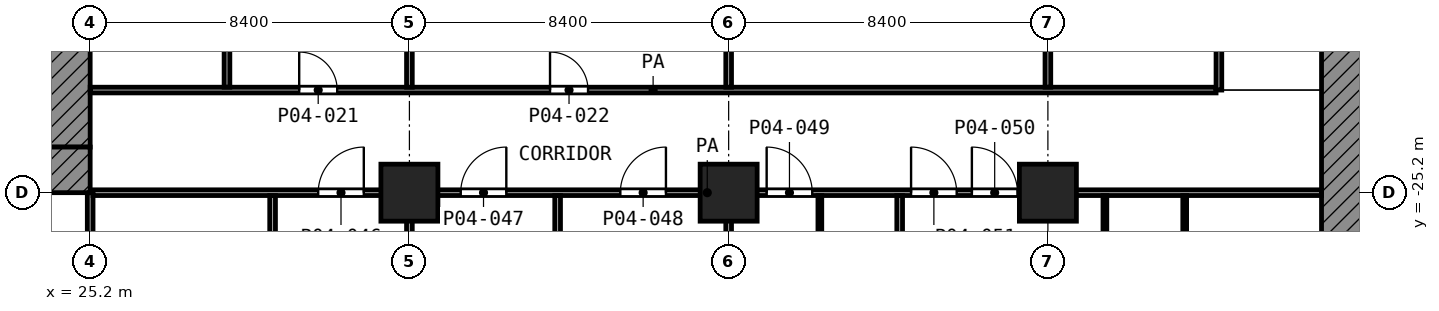
"""IFC4 building model, lengths in metres.
Left out: names, types, materials, properties, quantities, classifications, styles, units other than length and angle.
Written with IfcOpenShell. Run it as: python <this file> out.ifc"""

import sys

from ifc_helpers import new_model, si_unit, direction, frame, frame_2d, origin, origin_2d, place, context, subcontext, project, spatial, polyline, rectangle, outline, extrude, element, fill, save


model = new_model("IFC4")
c1 = context("Model", 3, precision=1e-05, world=origin(), true_north=direction((0.0, 1.0)))
c2 = subcontext(c1, "Body", "Model", "MODEL_VIEW")
j1 = project(units=[si_unit("LENGTHUNIT", "METRE"), si_unit("PLANEANGLEUNIT", "RADIAN")], contexts=[c1])
p1 = place(None, origin())
s1 = spatial("IfcSite", under=j1, at=p1, CompositionType="ELEMENT")
p2 = place(p1, origin())
s2 = spatial("IfcBuilding", under=s1, at=p2, CompositionType="ELEMENT")
p3 = place(p2, frame((0.0, 0.0, 18.2)))
s3 = spatial("IfcBuildingStorey", under=s2, at=p3, CompositionType="ELEMENT", Elevation=18.2)
for number, where, z_axis, x_axis in (
    (1, (33.6, -25.2, 0.0), (0.0, 0.0, 1.0), (1.0, 0.0, 0.0)),
    (2, (42.0, -25.2, 0.0), (0.0, 0.0, 1.0), (1.0, 0.0, 0.0)),
    (3, (50.4, -25.2, 0.0), (0.0, 0.0, 1.0), (1.0, 0.0, 0.0)),
):
    element("IfcColumn", number, at=place(p3, frame(where, z_axis=z_axis, x_axis=x_axis)), inside=s3, PredefinedType="COLUMN", context=c2, shape_type="SweptSolid", body=[
        extrude(rectangle(XDim=1.5, YDim=1.5, at=origin_2d()), origin(), (0.0, 0.0, 1.0), 5.6),
    ])
p4 = place(p3, frame((0.0, 0.0, -18.2), z_axis=(0.0, -1.0, 0.0), x_axis=(1.0, 0.0, 0.0)))
e4 = element("IfcWall", 4, at=p4, inside=s3, PredefinedType="SHEAR", context=c2, shape_type="SweptSolid", body=[
    extrude(outline(polyline([(67.2, 23.25), (67.2, 22.4), (65.406, 21.022), (63.824, 19.406), (62.938, 18.2), (57.6, 18.2), (57.6, 23.25), (67.2, 23.25)])), origin(), (0.0, 0.0, 1.0), 33.6),
])
p5 = place(p3, frame((24.6, -24.0, 0.0), z_axis=(0.0, 0.0, 1.0), x_axis=(0.0, 1.0, 0.0)))
e5 = element("IfcWall", 5, at=p5, inside=s3, PredefinedType="SHEAR", context=c2, shape_type="SweptSolid", body=[
    extrude(rectangle(XDim=18.6, YDim=1.2, at=frame_2d((9.3, 0.0))), origin(), (0.0, 0.0, 1.0), 5.05),
])
p6 = place(p5, frame((10.5, 0.0, 0.0)))
e6 = element("IfcOpeningElement", 6, at=p6, cuts=e5, PredefinedType="OPENING", context=c2, shape_type="SweptSolid", body=[
    extrude(rectangle(XDim=1.8, YDim=2.1, at=frame_2d((0.9, 1.05))), frame((0.0, 0.61, 0.0), z_axis=(0.0, -1.0, 0.0), x_axis=(1.0, 0.0, 0.0)), (0.0, 0.0, 1.0), 1.22),
])
p7 = place(p3, frame((24.6, -25.2, 0.0), z_axis=(0.0, 0.0, 1.0), x_axis=(0.0, 1.0, 0.0)))
e7 = element("IfcWall", 7, at=p7, inside=s3, PredefinedType="SHEAR", context=c2, shape_type="SweptSolid", body=[
    extrude(rectangle(XDim=1.2, YDim=1.2, at=frame_2d((0.6, 0.0))), origin(), (0.0, 0.0, 1.0), 5.05),
])
p8 = place(p3, frame((44.4, -27.9, 0.0), z_axis=(0.0, 0.0, 1.0), x_axis=(0.0, 1.0, 0.0)))
e8 = element("IfcWall", 8, at=p8, inside=s3, PredefinedType="PARTITIONING", context=c2, shape_type="SweptSolid", body=[
    extrude(rectangle(XDim=2.625, YDim=0.1, at=frame_2d((1.312, 0.0))), origin(), (0.0, 0.0, 1.0), 5.05),
])
for number, where, z_axis, x_axis in (
    (9, (51.9, -27.898, 0.0), (0.0, 0.0, 1.0), (0.0, 1.0, 0.0)),
    (10, (54.0, -27.898, 0.0), (0.0, 0.0, 1.0), (0.0, 1.0, 0.0)),
):
    element("IfcWall", number, at=place(p3, frame(where, z_axis=z_axis, x_axis=x_axis)), inside=s3, PredefinedType="PARTITIONING", context=c2, shape_type="SweptSolid", body=[
        extrude(rectangle(XDim=2.623, YDim=0.1, at=frame_2d((1.312, 0.0))), origin(), (0.0, 0.0, 1.0), 5.05),
    ])
p9 = place(p3, frame((25.275, -25.2, 0.0), z_axis=(0.0, 0.0, 1.0), x_axis=(1.0, 0.0, 0.0)))
e11 = element("IfcWall", 11, at=p9, inside=s3, PredefinedType="PARTITIONING", context=c2, shape_type="SweptSolid", body=[
    extrude(rectangle(XDim=32.325, YDim=0.15, at=frame_2d((16.163, 0.0))), origin(), (0.0, 0.0, 1.0), 5.05),
])
p10 = place(p9, frame((5.925, 0.0, 0.0)))
e12 = element("IfcOpeningElement", 12, at=p10, cuts=e11, PredefinedType="OPENING", context=c2, shape_type="SweptSolid", body=[
    extrude(rectangle(XDim=1.2, YDim=2.1, at=frame_2d((0.6, 1.05))), frame((0.0, 0.085, 0.0), z_axis=(0.0, -1.0, 0.0), x_axis=(1.0, 0.0, 0.0)), (0.0, 0.0, 1.0), 0.17),
])
p11 = place(p9, frame((9.675, 0.0, 0.0)))
e13 = element("IfcOpeningElement", 13, at=p11, cuts=e11, PredefinedType="OPENING", context=c2, shape_type="SweptSolid", body=[
    extrude(rectangle(XDim=1.2, YDim=2.1, at=frame_2d((0.6, 1.05))), frame((0.0, 0.085, 0.0), z_axis=(0.0, -1.0, 0.0), x_axis=(1.0, 0.0, 0.0)), (0.0, 0.0, 1.0), 0.17),
])
p12 = place(p9, frame((13.875, 0.0, 0.0)))
e14 = element("IfcOpeningElement", 14, at=p12, cuts=e11, PredefinedType="OPENING", context=c2, shape_type="SweptSolid", body=[
    extrude(rectangle(XDim=1.2, YDim=2.1, at=frame_2d((0.6, 1.05))), frame((0.0, 0.085, 0.0), z_axis=(0.0, -1.0, 0.0), x_axis=(1.0, 0.0, 0.0)), (0.0, 0.0, 1.0), 0.17),
])
p13 = place(p9, frame((17.725, 0.0, 0.0)))
e15 = element("IfcOpeningElement", 15, at=p13, cuts=e11, PredefinedType="OPENING", context=c2, shape_type="SweptSolid", body=[
    extrude(rectangle(XDim=1.2, YDim=2.1, at=frame_2d((0.6, 1.05))), frame((0.0, 0.085, 0.0), z_axis=(0.0, -1.0, 0.0), x_axis=(1.0, 0.0, 0.0)), (0.0, 0.0, 1.0), 0.17),
])
p14 = place(p9, frame((23.125, 0.0, 0.0)))
e16 = element("IfcOpeningElement", 16, at=p14, cuts=e11, PredefinedType="OPENING", context=c2, shape_type="SweptSolid", body=[
    extrude(rectangle(XDim=1.2, YDim=2.1, at=frame_2d((0.6, 1.05))), frame((0.0, 0.085, 0.0), z_axis=(0.0, -1.0, 0.0), x_axis=(1.0, 0.0, 0.0)), (0.0, 0.0, 1.0), 0.17),
])
p15 = place(p9, frame((21.525, 0.0, 0.0)))
e17 = element("IfcOpeningElement", 17, at=p15, cuts=e11, PredefinedType="OPENING", context=c2, shape_type="SweptSolid", body=[
    extrude(rectangle(XDim=1.2, YDim=2.1, at=frame_2d((0.6, 1.05))), frame((0.0, 0.085, 0.0), z_axis=(0.0, -1.0, 0.0), x_axis=(1.0, 0.0, 0.0)), (0.0, 0.0, 1.0), 0.17),
])
p16 = place(p3, frame((25.2, -22.5, 0.0), z_axis=(0.0, 0.0, 1.0), x_axis=(1.0, 0.0, 0.0)))
e18 = element("IfcWall", 18, at=p16, inside=s3, PredefinedType="PARTITIONING", context=c2, shape_type="SweptSolid", body=[
    extrude(rectangle(XDim=29.625, YDim=0.15, at=frame_2d((14.812, 0.0))), origin(), (0.0, 0.0, 1.0), 5.05),
])
p17 = place(p16, frame((5.5, 0.0, 0.0)))
e19 = element("IfcOpeningElement", 19, at=p17, cuts=e18, PredefinedType="OPENING", context=c2, shape_type="SweptSolid", body=[
    extrude(rectangle(XDim=1.0, YDim=2.1, at=frame_2d((0.5, 1.05))), frame((0.0, 0.085, 0.0), z_axis=(0.0, -1.0, 0.0), x_axis=(1.0, 0.0, 0.0)), (0.0, 0.0, 1.0), 0.17),
])
p18 = place(p16, frame((12.1, 0.0, 0.0)))
e20 = element("IfcOpeningElement", 20, at=p18, cuts=e18, PredefinedType="OPENING", context=c2, shape_type="SweptSolid", body=[
    extrude(rectangle(XDim=1.0, YDim=2.1, at=frame_2d((0.5, 1.05))), frame((0.0, 0.085, 0.0), z_axis=(0.0, -1.0, 0.0), x_axis=(1.0, 0.0, 0.0)), (0.0, 0.0, 1.0), 0.17),
])
p19 = place(p3, frame((25.2, -81.3, 0.0), z_axis=(0.0, 0.0, 1.0), x_axis=(0.0, 1.0, 0.0)))
e21 = element("IfcWall", 21, at=p19, inside=s3, PredefinedType="PARTITIONING", context=c2, shape_type="SweptSolid", body=[
    extrude(rectangle(XDim=56.1, YDim=0.15, at=frame_2d((28.05, 0.0))), origin(), (0.0, 0.0, 1.0), 5.05),
])
p20 = place(p19, frame((48.5, 0.0, 0.0)))
e22 = element("IfcOpeningElement", 22, at=p20, cuts=e21, PredefinedType="OPENING", context=c2, shape_type="SweptSolid", body=[
    extrude(rectangle(XDim=1.2, YDim=2.1, at=frame_2d((0.6, 1.05))), frame((0.0, 0.085, 0.0), z_axis=(0.0, -1.0, 0.0), x_axis=(1.0, 0.0, 0.0)), (0.0, 0.0, 1.0), 0.17),
])
p21 = place(p19, frame((40.1, 0.0, 0.0)))
e23 = element("IfcOpeningElement", 23, at=p21, cuts=e21, PredefinedType="OPENING", context=c2, shape_type="SweptSolid", body=[
    extrude(rectangle(XDim=1.2, YDim=2.1, at=frame_2d((0.6, 1.05))), frame((0.0, 0.085, 0.0), z_axis=(0.0, -1.0, 0.0), x_axis=(1.0, 0.0, 0.0)), (0.0, 0.0, 1.0), 0.17),
])
p22 = place(p19, frame((37.3, 0.0, 0.0)))
e24 = element("IfcOpeningElement", 24, at=p22, cuts=e21, PredefinedType="OPENING", context=c2, shape_type="SweptSolid", body=[
    extrude(rectangle(XDim=1.2, YDim=2.1, at=frame_2d((0.6, 1.05))), frame((0.0, 0.085, 0.0), z_axis=(0.0, -1.0, 0.0), x_axis=(1.0, 0.0, 0.0)), (0.0, 0.0, 1.0), 0.17),
])
p23 = place(p19, frame((28.9, 0.0, 0.0)))
e25 = element("IfcOpeningElement", 25, at=p23, cuts=e21, PredefinedType="OPENING", context=c2, shape_type="SweptSolid", body=[
    extrude(rectangle(XDim=1.2, YDim=2.1, at=frame_2d((0.6, 1.05))), frame((0.0, 0.085, 0.0), z_axis=(0.0, -1.0, 0.0), x_axis=(1.0, 0.0, 0.0)), (0.0, 0.0, 1.0), 0.17),
])
p24 = place(p19, frame((23.3, 0.0, 0.0)))
e26 = element("IfcOpeningElement", 26, at=p24, cuts=e21, PredefinedType="OPENING", context=c2, shape_type="SweptSolid", body=[
    extrude(rectangle(XDim=1.2, YDim=2.1, at=frame_2d((0.6, 1.05))), frame((0.0, 0.085, 0.0), z_axis=(0.0, -1.0, 0.0), x_axis=(1.0, 0.0, 0.0)), (0.0, 0.0, 1.0), 0.17),
])
p25 = place(p19, frame((20.6, 0.0, 0.0)))
e27 = element("IfcOpeningElement", 27, at=p25, cuts=e21, PredefinedType="OPENING", context=c2, shape_type="SweptSolid", body=[
    extrude(rectangle(XDim=1.1, YDim=2.1, at=frame_2d((0.55, 1.05))), frame((0.0, 0.085, 0.0), z_axis=(0.0, -1.0, 0.0), x_axis=(1.0, 0.0, 0.0)), (0.0, 0.0, 1.0), 0.17),
])
p26 = place(p19, frame((14.9, 0.0, 0.0)))
e28 = element("IfcOpeningElement", 28, at=p26, cuts=e21, PredefinedType="OPENING", context=c2, shape_type="SweptSolid", body=[
    extrude(rectangle(XDim=1.1, YDim=2.1, at=frame_2d((0.55, 1.05))), frame((0.0, 0.085, 0.0), z_axis=(0.0, -1.0, 0.0), x_axis=(1.0, 0.0, 0.0)), (0.0, 0.0, 1.0), 0.17),
])
p27 = place(p19, frame((7.5, 0.0, 0.0)))
e29 = element("IfcOpeningElement", 29, at=p27, cuts=e21, PredefinedType="OPENING", context=c2, shape_type="SweptSolid", body=[
    extrude(rectangle(XDim=1.2, YDim=2.1, at=frame_2d((0.6, 1.05))), frame((0.0, 0.085, 0.0), z_axis=(0.0, -1.0, 0.0), x_axis=(1.0, 0.0, 0.0)), (0.0, 0.0, 1.0), 0.17),
])
p28 = place(p19, frame((11.7, 0.0, 0.0)))
e30 = element("IfcOpeningElement", 30, at=p28, cuts=e21, PredefinedType="OPENING", context=c2, shape_type="SweptSolid", body=[
    extrude(rectangle(XDim=1.2, YDim=2.1, at=frame_2d((0.6, 1.05))), frame((0.0, 0.085, 0.0), z_axis=(0.0, -1.0, 0.0), x_axis=(1.0, 0.0, 0.0)), (0.0, 0.0, 1.0), 0.17),
])
p29 = place(p19, frame((3.15, 0.0, 0.0)))
e31 = element("IfcOpeningElement", 31, at=p29, cuts=e21, PredefinedType="OPENING", context=c2, shape_type="SweptSolid", body=[
    extrude(rectangle(XDim=1.2, YDim=2.1, at=frame_2d((0.6, 1.05))), frame((0.0, 0.085, 0.0), z_axis=(0.0, -1.0, 0.0), x_axis=(1.0, 0.0, 0.0)), (0.0, 0.0, 1.0), 0.17),
])
p30 = place(p3, frame((28.8, -22.425, 0.0), z_axis=(0.0, 0.0, 1.0), x_axis=(0.0, 1.0, 0.0)))
e32 = element("IfcWall", 32, at=p30, inside=s3, PredefinedType="PARTITIONING", context=c2, shape_type="SweptSolid", body=[
    extrude(rectangle(XDim=8.25, YDim=0.15, at=frame_2d((4.125, 0.0))), origin(), (0.0, 0.0, 1.0), 5.05),
])
for number, where, z_axis, x_axis in (
    (33, (30.0, -39.525, 0.0), (0.0, 0.0, 1.0), (0.0, 1.0, 0.0)),
    (34, (33.6, -39.525, 0.0), (0.0, 0.0, 1.0), (0.0, 1.0, 0.0)),
):
    element("IfcWall", number, at=place(p3, frame(where, z_axis=z_axis, x_axis=x_axis)), inside=s3, PredefinedType="PARTITIONING", context=c2, shape_type="SweptSolid", body=[
        extrude(rectangle(XDim=14.25, YDim=0.15, at=frame_2d((7.125, 0.0))), origin(), (0.0, 0.0, 1.0), 5.05),
    ])
p31 = place(p3, frame((33.6, -22.425, 0.0), z_axis=(0.0, 0.0, 1.0), x_axis=(0.0, 1.0, 0.0)))
e35 = element("IfcWall", 35, at=p31, inside=s3, PredefinedType="PARTITIONING", context=c2, shape_type="SweptSolid", body=[
    extrude(rectangle(XDim=11.25, YDim=0.15, at=frame_2d((5.625, 0.0))), origin(), (0.0, 0.0, 1.0), 5.05),
])
p32 = place(p3, frame((37.5, -39.525, 0.0), z_axis=(0.0, 0.0, 1.0), x_axis=(0.0, 1.0, 0.0)))
e36 = element("IfcWall", 36, at=p32, inside=s3, PredefinedType="PARTITIONING", context=c2, shape_type="SweptSolid", body=[
    extrude(rectangle(XDim=14.25, YDim=0.15, at=frame_2d((7.125, 0.0))), origin(), (0.0, 0.0, 1.0), 3.65),
])
p33 = place(p3, frame((42.0, -35.68, 0.0), z_axis=(0.0, 0.0, 1.0), x_axis=(0.0, 1.0, 0.0)))
e37 = element("IfcWall", 37, at=p33, inside=s3, PredefinedType="PARTITIONING", context=c2, shape_type="SweptSolid", body=[
    extrude(rectangle(XDim=10.405, YDim=0.15, at=frame_2d((5.203, 0.0))), origin(), (0.0, 0.0, 1.0), 3.65),
])
p34 = place(p3, frame((42.0, -22.425, 0.0), z_axis=(0.0, 0.0, 1.0), x_axis=(0.0, 1.0, 0.0)))
e38 = element("IfcWall", 38, at=p34, inside=s3, PredefinedType="PARTITIONING", context=c2, shape_type="SweptSolid", body=[
    extrude(rectangle(XDim=11.25, YDim=0.15, at=frame_2d((5.625, 0.0))), origin(), (0.0, 0.0, 1.0), 5.05),
])
p35 = place(p3, frame((46.5, -35.68, 0.0), z_axis=(0.0, 0.0, 1.0), x_axis=(0.0, 1.0, 0.0)))
e39 = element("IfcWall", 39, at=p35, inside=s3, PredefinedType="PARTITIONING", context=c2, shape_type="SweptSolid", body=[
    extrude(rectangle(XDim=10.405, YDim=0.15, at=frame_2d((5.203, 0.0))), origin(), (0.0, 0.0, 1.0), 3.65),
])
p36 = place(p3, frame((50.4, -22.425, 0.0), z_axis=(0.0, 0.0, 1.0), x_axis=(0.0, 1.0, 0.0)))
e40 = element("IfcWall", 40, at=p36, inside=s3, PredefinedType="PARTITIONING", context=c2, shape_type="SweptSolid", body=[
    extrude(rectangle(XDim=11.25, YDim=0.15, at=frame_2d((5.625, 0.0))), origin(), (0.0, 0.0, 1.0), 5.05),
])
p37 = place(p3, frame((54.9, -22.5, 0.0), z_axis=(0.0, 0.0, 1.0), x_axis=(0.0, 1.0, 0.0)))
e41 = element("IfcWall", 41, at=p37, inside=s3, PredefinedType="PARTITIONING", context=c2, shape_type="SweptSolid", body=[
    extrude(rectangle(XDim=11.4, YDim=0.15, at=frame_2d((5.7, 0.0))), origin(), (0.0, 0.0, 1.0), 5.05),
])
p38 = place(p37, frame((5.2, 0.0, 0.0)))
e42 = element("IfcOpeningElement", 42, at=p38, cuts=e41, PredefinedType="OPENING", context=c2, shape_type="SweptSolid", body=[
    extrude(rectangle(XDim=1.0, YDim=2.1, at=frame_2d((0.5, 1.05))), frame((0.0, 0.085, 0.0), z_axis=(0.0, -1.0, 0.0), x_axis=(1.0, 0.0, 0.0)), (0.0, 0.0, 1.0), 0.17),
])
p39 = place(p17, origin())
e43 = element("IfcDoor", 43, at=p39, inside=s3, OperationType="SINGLE_SWING_LEFT", PredefinedType="DOOR", context=c2, shape_type="SweptSolid", body=[
    extrude(rectangle(XDim=1.0, YDim=2.1, at=frame_2d((0.5, 1.05))), frame((0.0, 0.025, 0.0), z_axis=(0.0, -1.0, 0.0), x_axis=(1.0, 0.0, 0.0)), (0.0, 0.0, 1.0), 0.05),
])
fill(e19, e43)
p40 = place(p18, origin())
e44 = element("IfcDoor", 44, at=p40, inside=s3, OperationType="SINGLE_SWING_LEFT", PredefinedType="DOOR", context=c2, shape_type="SweptSolid", body=[
    extrude(rectangle(XDim=1.0, YDim=2.1, at=frame_2d((0.5, 1.05))), frame((0.0, 0.025, 0.0), z_axis=(0.0, -1.0, 0.0), x_axis=(1.0, 0.0, 0.0)), (0.0, 0.0, 1.0), 0.05),
])
fill(e20, e44)
p41 = place(p10, origin())
e45 = element("IfcDoor", 45, at=p41, inside=s3, OperationType="SINGLE_SWING_RIGHT", PredefinedType="DOOR", context=c2, shape_type="SweptSolid", body=[
    extrude(rectangle(XDim=1.2, YDim=2.1, at=frame_2d((0.6, 1.05))), frame((0.0, 0.025, 0.0), z_axis=(0.0, -1.0, 0.0), x_axis=(1.0, 0.0, 0.0)), (0.0, 0.0, 1.0), 0.05),
])
fill(e12, e45)
p42 = place(p11, origin())
e46 = element("IfcDoor", 46, at=p42, inside=s3, OperationType="SINGLE_SWING_RIGHT", PredefinedType="DOOR", context=c2, shape_type="SweptSolid", body=[
    extrude(rectangle(XDim=1.2, YDim=2.1, at=frame_2d((0.6, 1.05))), frame((0.0, 0.025, 0.0), z_axis=(0.0, -1.0, 0.0), x_axis=(1.0, 0.0, 0.0)), (0.0, 0.0, 1.0), 0.05),
])
fill(e13, e46)
p43 = place(p12, origin())
e47 = element("IfcDoor", 47, at=p43, inside=s3, OperationType="SINGLE_SWING_RIGHT", PredefinedType="DOOR", context=c2, shape_type="SweptSolid", body=[
    extrude(rectangle(XDim=1.2, YDim=2.1, at=frame_2d((0.6, 1.05))), frame((0.0, 0.025, 0.0), z_axis=(0.0, -1.0, 0.0), x_axis=(1.0, 0.0, 0.0)), (0.0, 0.0, 1.0), 0.05),
])
fill(e14, e47)
p44 = place(p13, origin())
e48 = element("IfcDoor", 48, at=p44, inside=s3, OperationType="SINGLE_SWING_LEFT", PredefinedType="DOOR", context=c2, shape_type="SweptSolid", body=[
    extrude(rectangle(XDim=1.2, YDim=2.1, at=frame_2d((0.6, 1.05))), frame((0.0, 0.025, 0.0), z_axis=(0.0, -1.0, 0.0), x_axis=(1.0, 0.0, 0.0)), (0.0, 0.0, 1.0), 0.05),
])
fill(e15, e48)
p45 = place(p14, origin())
e49 = element("IfcDoor", 49, at=p45, inside=s3, OperationType="SINGLE_SWING_LEFT", PredefinedType="DOOR", context=c2, shape_type="SweptSolid", body=[
    extrude(rectangle(XDim=1.2, YDim=2.1, at=frame_2d((0.6, 1.05))), frame((0.0, 0.025, 0.0), z_axis=(0.0, -1.0, 0.0), x_axis=(1.0, 0.0, 0.0)), (0.0, 0.0, 1.0), 0.05),
])
fill(e16, e49)
p46 = place(p15, origin())
e50 = element("IfcDoor", 50, at=p46, inside=s3, OperationType="SINGLE_SWING_LEFT", PredefinedType="DOOR", context=c2, shape_type="SweptSolid", body=[
    extrude(rectangle(XDim=1.2, YDim=2.1, at=frame_2d((0.6, 1.05))), frame((0.0, 0.025, 0.0), z_axis=(0.0, -1.0, 0.0), x_axis=(1.0, 0.0, 0.0)), (0.0, 0.0, 1.0), 0.05),
])
fill(e17, e50)
save(model, sys.argv[1])
